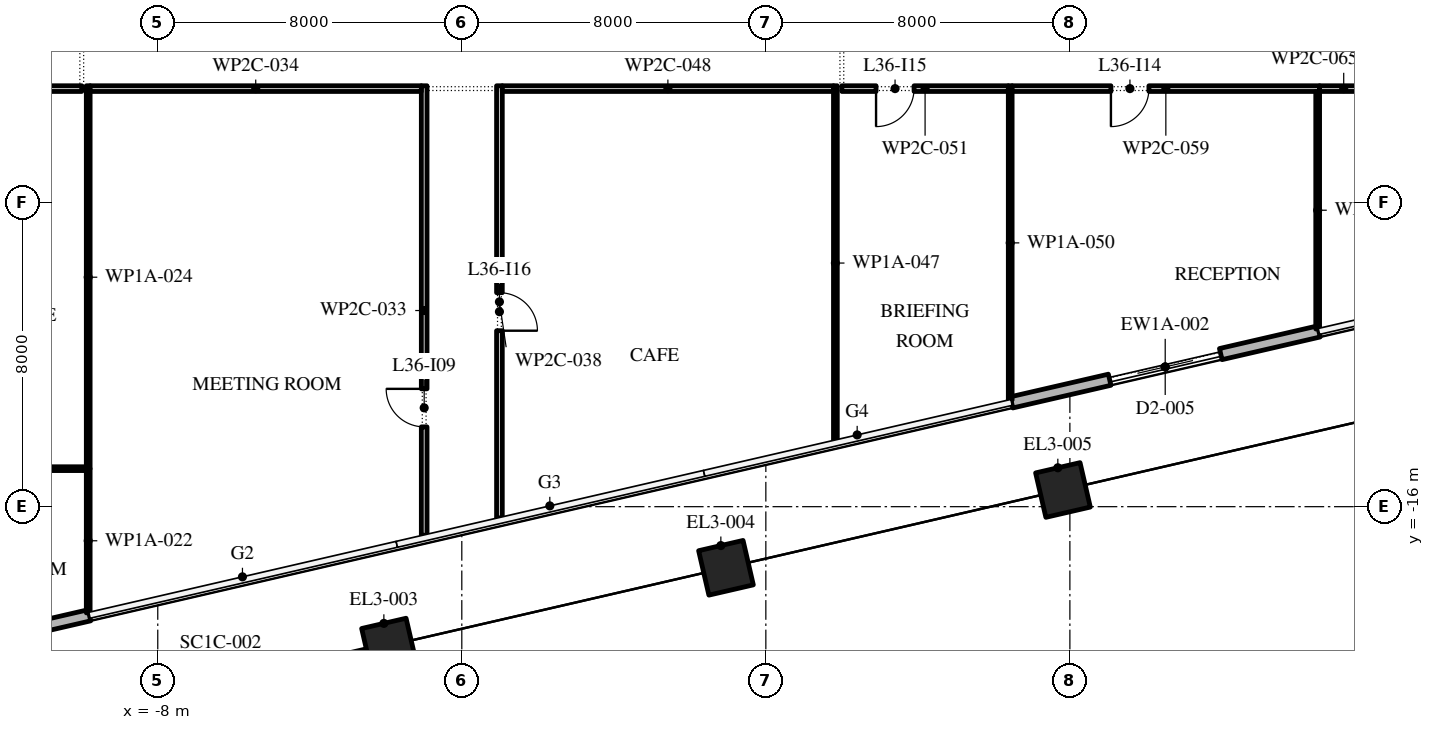
"""IFC4 building model, lengths in metres.
Left out: names, types, materials, properties, quantities, classifications, styles, units other than length and angle.
Written with IfcOpenShell. Run it as: python <this file> out.ifc"""

import sys

from ifc_helpers import new_model, si_unit, direction, frame, frame_2d, origin, origin_2d, place, context, subcontext, project, spatial, rectangle, extrude, element, fill, save


model = new_model("IFC4")
c1 = context("Model", 3, precision=1e-05, world=origin(), true_north=direction((0.0, 1.0)))
c2 = subcontext(c1, "Body", "Model", "MODEL_VIEW")
j1 = project(units=[si_unit("LENGTHUNIT", "METRE"), si_unit("PLANEANGLEUNIT", "RADIAN")], contexts=[c1])
p1 = place(None, origin())
s1 = spatial("IfcSite", under=j1, at=p1, CompositionType="ELEMENT")
p2 = place(p1, origin())
s2 = spatial("IfcBuilding", under=s1, at=p2, CompositionType="ELEMENT")
p3 = place(p2, frame((0.0, 0.0, 165.6)))
s3 = spatial("IfcBuildingStorey", under=s2, at=p3, CompositionType="ELEMENT", Elevation=165.6)
for number, where, z_axis, x_axis in (
    (1, (-1.916, -19.655, 0.0), (0.0, 0.0, 1.0), (0.974, 0.225, 0.0)),
    (2, (6.951, -17.608, 0.0), (0.0, 0.0, 1.0), (0.974, 0.225, 0.0)),
    (3, (15.818, -15.561, 0.0), (0.0, 0.0, 1.0), (0.974, 0.225, 0.0)),
):
    element("IfcColumn", number, at=place(p3, frame(where, z_axis=z_axis, x_axis=x_axis)), inside=s3, PredefinedType="COLUMN", context=c2, shape_type="SweptSolid", body=[
        extrude(rectangle(XDim=1.2, YDim=1.2, at=origin_2d()), origin(), (0.0, 0.0, 1.0), 6.0),
    ])
p4 = place(p3, frame((-17.592, -20.657, 0.0), z_axis=(0.0, 0.0, 1.0), x_axis=(0.974371132389, 0.224946429994, 0.0)))
e4 = element("IfcWall", 4, at=p4, inside=s3, PredefinedType="STANDARD", context=c2, shape_type="SweptSolid", body=[
    extrude(rectangle(XDim=8.0, YDim=0.3, at=frame_2d((4.0, 0.0))), origin(), (0.0, 0.0, 1.0), 5.8),
])
p5 = place(p4, frame((2.5, 0.0, 0.0)))
e5 = element("IfcOpeningElement", 5, at=p5, cuts=e4, PredefinedType="OPENING", context=c2, shape_type="SweptSolid", body=[
    extrude(rectangle(XDim=3.0, YDim=3.5, at=frame_2d((1.5, 1.75))), frame((0.0, 0.16, 0.0), z_axis=(0.0, -1.0, 0.0), x_axis=(1.0, 0.0, 0.0)), (0.0, 0.0, 1.0), 0.32),
])
p6 = place(p3, frame((14.465, -13.256, 0.0), z_axis=(0.0, 0.0, 1.0), x_axis=(0.974368386566, 0.224958323385, 0.0)))
e6 = element("IfcWall", 6, at=p6, inside=s3, PredefinedType="STANDARD", context=c2, shape_type="SweptSolid", body=[
    extrude(rectangle(XDim=8.3, YDim=0.3, at=frame_2d((4.15, 0.0))), origin(), (0.0, 0.0, 1.0), 5.8),
])
p7 = place(p6, frame((2.65, 0.0, 0.0)))
e7 = element("IfcOpeningElement", 7, at=p7, cuts=e6, PredefinedType="OPENING", context=c2, shape_type="SweptSolid", body=[
    extrude(rectangle(XDim=3.0, YDim=3.5, at=frame_2d((1.5, 1.75))), frame((0.0, 0.16, 0.0), z_axis=(0.0, -1.0, 0.0), x_axis=(1.0, 0.0, 0.0)), (0.0, 0.0, 1.0), 0.32),
])
p8 = place(p3, frame((-10.178, -21.563, 0.0), z_axis=(0.0, 0.0, 1.0), x_axis=(0.974370774795, 0.22494797893, 0.0)))
e8 = element("IfcWall", 8, at=p8, inside=s3, PredefinedType="STANDARD", context=c2, shape_type="SweptSolid", body=[
    extrude(rectangle(XDim=7.86, YDim=0.1, at=frame_2d((3.93, 0.0))), origin(), (0.0, 0.0, 1.0), 4.85),
])
p9 = place(p8, frame((2.43, 0.0, 0.0)))
e9 = element("IfcOpeningElement", 9, at=p9, cuts=e8, PredefinedType="OPENING", context=c2, shape_type="SweptSolid", body=[
    extrude(rectangle(XDim=3.0, YDim=3.5, at=frame_2d((1.5, 1.75))), frame((0.0, 0.06, 0.0), z_axis=(0.0, -1.0, 0.0), x_axis=(1.0, 0.0, 0.0)), (0.0, 0.0, 1.0), 0.12),
])
p10 = place(p3, frame((-10.0, -5.0, 0.0), z_axis=(0.0, 0.0, 1.0), x_axis=(-1.0, 0.0, 0.0)))
e10 = element("IfcWall", 10, at=p10, inside=s3, PredefinedType="PARTITIONING", context=c2, shape_type="SweptSolid", body=[
    extrude(rectangle(XDim=8.45, YDim=0.15, at=frame_2d((4.225, 0.0))), origin(), (0.0, 0.0, 1.0), 5.8),
])
p11 = place(p10, frame((2.85, 0.0, 0.0)))
e11 = element("IfcOpeningElement", 11, at=p11, cuts=e10, PredefinedType="OPENING", context=c2, shape_type="SweptSolid", body=[
    extrude(rectangle(XDim=1.0, YDim=2.1, at=frame_2d((0.5, 1.05))), frame((0.0, 0.085, 0.0), z_axis=(0.0, -1.0, 0.0), x_axis=(1.0, 0.0, 0.0)), (0.0, 0.0, 1.0), 0.17),
])
p12 = place(p3, frame((-9.83, -18.794, 0.0), z_axis=(0.0, 0.0, 1.0), x_axis=(0.0, 1.0, 0.0)))
e12 = element("IfcWall", 12, at=p12, inside=s3, PredefinedType="PARTITIONING", context=c2, shape_type="SweptSolid", body=[
    extrude(rectangle(XDim=3.794, YDim=0.1, at=frame_2d((1.897, 0.0))), origin(), (0.0, 0.0, 1.0), 5.8),
])
p13 = place(p3, frame((-9.88, -15.0, 0.0), z_axis=(0.0, 0.0, 1.0), x_axis=(-1.0, 0.0, 0.0)))
e13 = element("IfcWall", 13, at=p13, inside=s3, PredefinedType="PARTITIONING", context=c2, shape_type="SweptSolid", body=[
    extrude(rectangle(XDim=8.62, YDim=0.1, at=frame_2d((4.31, 0.0))), origin(), (0.0, 0.0, 1.0), 5.8),
])
p14 = place(p13, frame((3.77, 0.0, 0.0)))
e14 = element("IfcOpeningElement", 14, at=p14, cuts=e13, PredefinedType="OPENING", context=c2, shape_type="SweptSolid", body=[
    extrude(rectangle(XDim=0.9, YDim=2.1, at=frame_2d((0.45, 1.05))), frame((0.0, 0.06, 0.0), z_axis=(0.0, -1.0, 0.0), x_axis=(1.0, 0.0, 0.0)), (0.0, 0.0, 1.0), 0.12),
])
p15 = place(p3, frame((-9.83, -15.0, 0.0), z_axis=(0.0, 0.0, 1.0), x_axis=(0.0, 1.0, 0.0)))
e15 = element("IfcWall", 15, at=p15, inside=s3, PredefinedType="PARTITIONING", context=c2, shape_type="SweptSolid", body=[
    extrude(rectangle(XDim=10.075, YDim=0.1, at=frame_2d((5.038, 0.0))), origin(), (0.0, 0.0, 1.0), 5.8),
])
p16 = place(p3, frame((-0.99, -16.753, 0.0), z_axis=(0.0, 0.0, 1.0), x_axis=(0.0, 1.0, 0.0)))
e16 = element("IfcWall", 16, at=p16, inside=s3, PredefinedType="PARTITIONING", context=c2, shape_type="SweptSolid", body=[
    extrude(rectangle(XDim=11.828, YDim=0.15, at=frame_2d((5.914, 0.0))), origin(), (0.0, 0.0, 1.0), 5.8),
])
p17 = place(p16, frame((2.853, 0.0, 0.0)))
e17 = element("IfcOpeningElement", 17, at=p17, cuts=e16, PredefinedType="OPENING", context=c2, shape_type="SweptSolid", body=[
    extrude(rectangle(XDim=1.0, YDim=2.1, at=frame_2d((0.5, 1.05))), frame((0.0, 0.085, 0.0), z_axis=(0.0, -1.0, 0.0), x_axis=(1.0, 0.0, 0.0)), (0.0, 0.0, 1.0), 0.17),
])
p18 = place(p3, frame((-1.065, -5.0, 0.0), z_axis=(0.0, 0.0, 1.0), x_axis=(-1.0, 0.0, 0.0)))
e18 = element("IfcWall", 18, at=p18, inside=s3, PredefinedType="PARTITIONING", context=c2, shape_type="SweptSolid", body=[
    extrude(rectangle(XDim=8.715, YDim=0.15, at=frame_2d((4.357, 0.0))), origin(), (0.0, 0.0, 1.0), 5.8),
])
p19 = place(p3, frame((0.99, -4.925, 0.0), z_axis=(0.0, 0.0, 1.0), x_axis=(0.0, -1.0, 0.0)))
e19 = element("IfcWall", 19, at=p19, inside=s3, PredefinedType="PARTITIONING", context=c2, shape_type="SweptSolid", body=[
    extrude(rectangle(XDim=11.371, YDim=0.15, at=frame_2d((5.686, 0.0))), origin(), (0.0, 0.0, 1.0), 5.8),
])
p20 = place(p19, frame((5.445, 0.0, 0.0)))
e20 = element("IfcOpeningElement", 20, at=p20, cuts=e19, PredefinedType="OPENING", context=c2, shape_type="SweptSolid", body=[
    extrude(rectangle(XDim=1.0, YDim=2.1, at=frame_2d((0.5, 1.05))), frame((0.0, 0.085, 0.0), z_axis=(0.0, -1.0, 0.0), x_axis=(1.0, 0.0, 0.0)), (0.0, 0.0, 1.0), 0.17),
])
p21 = place(p3, frame((9.83, -14.255, 0.0), z_axis=(0.0, 0.0, 1.0), x_axis=(0.0, 1.0, 0.0)))
e21 = element("IfcWall", 21, at=p21, inside=s3, PredefinedType="PARTITIONING", context=c2, shape_type="SweptSolid", body=[
    extrude(rectangle(XDim=9.33, YDim=0.1, at=frame_2d((4.665, 0.0))), origin(), (0.0, 0.0, 1.0), 5.8),
])
p22 = place(p3, frame((9.78, -5.0, 0.0), z_axis=(0.0, 0.0, 1.0), x_axis=(-1.0, 0.0, 0.0)))
e22 = element("IfcWall", 22, at=p22, inside=s3, PredefinedType="PARTITIONING", context=c2, shape_type="SweptSolid", body=[
    extrude(rectangle(XDim=8.715, YDim=0.15, at=frame_2d((4.357, 0.0))), origin(), (0.0, 0.0, 1.0), 5.8),
])
p23 = place(p3, frame((14.43, -13.193, 0.0), z_axis=(0.0, 0.0, 1.0), x_axis=(0.0, 1.0, 0.0)))
e23 = element("IfcWall", 23, at=p23, inside=s3, PredefinedType="PARTITIONING", context=c2, shape_type="SweptSolid", body=[
    extrude(rectangle(XDim=8.268, YDim=0.1, at=frame_2d((4.134, 0.0))), origin(), (0.0, 0.0, 1.0), 5.8),
])
p24 = place(p3, frame((14.38, -5.0, 0.0), z_axis=(0.0, 0.0, 1.0), x_axis=(-1.0, 0.0, 0.0)))
e24 = element("IfcWall", 24, at=p24, inside=s3, PredefinedType="PARTITIONING", context=c2, shape_type="SweptSolid", body=[
    extrude(rectangle(XDim=4.38, YDim=0.15, at=frame_2d((2.19, 0.0))), origin(), (0.0, 0.0, 1.0), 5.8),
])
p25 = place(p24, frame((2.48, 0.0, 0.0)))
e25 = element("IfcOpeningElement", 25, at=p25, cuts=e24, PredefinedType="OPENING", context=c2, shape_type="SweptSolid", body=[
    extrude(rectangle(XDim=1.0, YDim=2.1, at=frame_2d((0.5, 1.05))), frame((0.0, 0.085, 0.0), z_axis=(0.0, -1.0, 0.0), x_axis=(1.0, 0.0, 0.0)), (0.0, 0.0, 1.0), 0.17),
])
p26 = place(p3, frame((22.57, -5.0, 0.0), z_axis=(0.0, 0.0, 1.0), x_axis=(-1.0, 0.0, 0.0)))
e26 = element("IfcWall", 26, at=p26, inside=s3, PredefinedType="PARTITIONING", context=c2, shape_type="SweptSolid", body=[
    extrude(rectangle(XDim=8.09, YDim=0.15, at=frame_2d((4.045, 0.0))), origin(), (0.0, 0.0, 1.0), 5.8),
])
p27 = place(p26, frame((4.49, 0.0, 0.0)))
e27 = element("IfcOpeningElement", 27, at=p27, cuts=e26, PredefinedType="OPENING", context=c2, shape_type="SweptSolid", body=[
    extrude(rectangle(XDim=1.0, YDim=2.1, at=frame_2d((0.5, 1.05))), frame((0.0, 0.085, 0.0), z_axis=(0.0, -1.0, 0.0), x_axis=(1.0, 0.0, 0.0)), (0.0, 0.0, 1.0), 0.17),
])
p28 = place(p3, frame((22.52, -5.075, 0.0), z_axis=(0.0, 0.0, 1.0), x_axis=(0.0, -1.0, 0.0)))
e28 = element("IfcWall", 28, at=p28, inside=s3, PredefinedType="PARTITIONING", context=c2, shape_type="SweptSolid", body=[
    extrude(rectangle(XDim=6.25, YDim=0.1, at=frame_2d((3.125, 0.0))), origin(), (0.0, 0.0, 1.0), 5.8),
])
p29 = place(p3, frame((23.84, -5.0, 0.0), z_axis=(0.0, 0.0, 1.0), x_axis=(-1.0, 0.0, 0.0)))
e29 = element("IfcWall", 29, at=p29, inside=s3, PredefinedType="PARTITIONING", context=c2, shape_type="SweptSolid", body=[
    extrude(rectangle(XDim=1.27, YDim=0.15, at=frame_2d((0.635, 0.0))), origin(), (0.0, 0.0, 1.0), 5.8),
])
p30 = place(p7, origin())
e30 = element("IfcDoor", 30, at=p30, inside=s3, OperationType="DOUBLE_DOOR_SLIDING", PredefinedType="DOOR", context=c2, shape_type="SweptSolid", body=[
    extrude(rectangle(XDim=3.0, YDim=3.5, at=frame_2d((1.5, 1.75))), frame((0.0, 0.025, 0.0), z_axis=(0.0, -1.0, 0.0), x_axis=(1.0, 0.0, 0.0)), (0.0, 0.0, 1.0), 0.05),
])
fill(e7, e30)
p31 = place(p17, origin())
e31 = element("IfcDoor", 31, at=p31, inside=s3, OperationType="SINGLE_SWING_LEFT", PredefinedType="DOOR", context=c2, shape_type="SweptSolid", body=[
    extrude(rectangle(XDim=1.0, YDim=2.1, at=frame_2d((0.5, 1.05))), frame((0.0, 0.025, 0.0), z_axis=(0.0, -1.0, 0.0), x_axis=(1.0, 0.0, 0.0)), (0.0, 0.0, 1.0), 0.05),
])
fill(e17, e31)
p32 = place(p27, origin())
e32 = element("IfcDoor", 32, at=p32, inside=s3, OperationType="SINGLE_SWING_LEFT", PredefinedType="DOOR", context=c2, shape_type="SweptSolid", body=[
    extrude(rectangle(XDim=1.0, YDim=2.1, at=frame_2d((0.5, 1.05))), frame((0.0, 0.025, 0.0), z_axis=(0.0, -1.0, 0.0), x_axis=(1.0, 0.0, 0.0)), (0.0, 0.0, 1.0), 0.05),
])
fill(e27, e32)
p33 = place(p25, origin())
e33 = element("IfcDoor", 33, at=p33, inside=s3, OperationType="SINGLE_SWING_LEFT", PredefinedType="DOOR", context=c2, shape_type="SweptSolid", body=[
    extrude(rectangle(XDim=1.0, YDim=2.1, at=frame_2d((0.5, 1.05))), frame((0.0, 0.025, 0.0), z_axis=(0.0, -1.0, 0.0), x_axis=(1.0, 0.0, 0.0)), (0.0, 0.0, 1.0), 0.05),
])
fill(e25, e33)
p34 = place(p20, origin())
e34 = element("IfcDoor", 34, at=p34, inside=s3, OperationType="SINGLE_SWING_LEFT", PredefinedType="DOOR", context=c2, shape_type="SweptSolid", body=[
    extrude(rectangle(XDim=1.0, YDim=2.1, at=frame_2d((0.5, 1.05))), frame((0.0, 0.025, 0.0), z_axis=(0.0, -1.0, 0.0), x_axis=(1.0, 0.0, 0.0)), (0.0, 0.0, 1.0), 0.05),
])
fill(e20, e34)
save(model, sys.argv[1])
